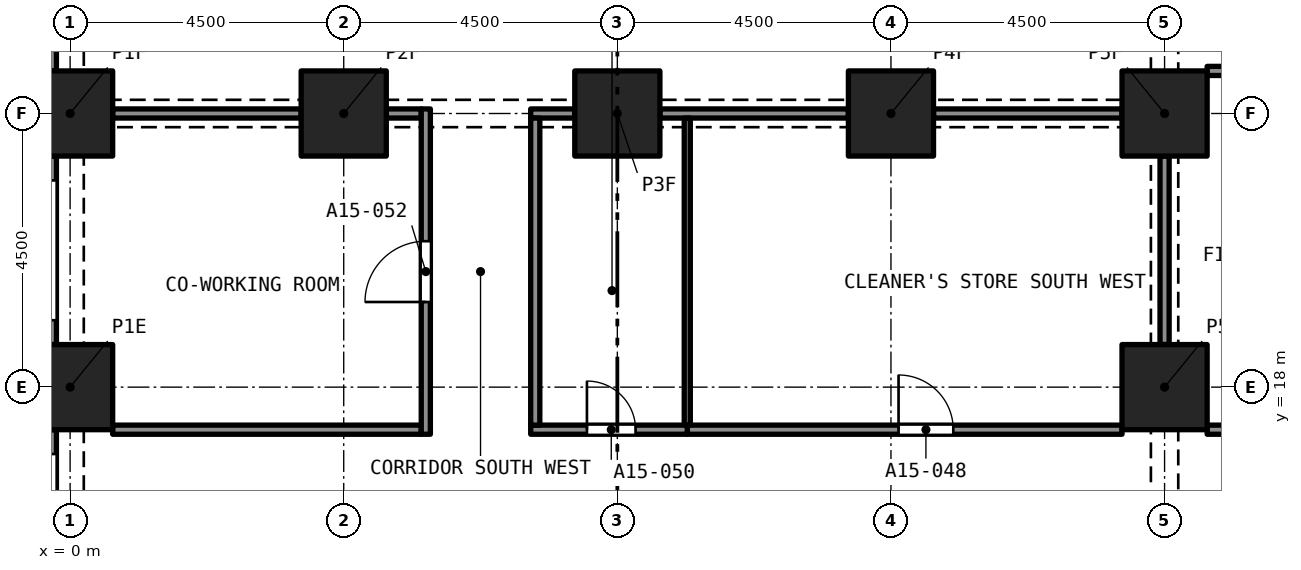
"""IFC4 building model, lengths in metres.
Left out: names, types, materials, properties, quantities, classifications, styles, units other than length and angle.
Written with IfcOpenShell. Run it as: python <this file> out.ifc"""

import sys

from ifc_helpers import new_model, si_unit, direction, frame, frame_2d, origin, origin_2d, place, context, subcontext, project, spatial, rectangle, extrude, element, fill, save


model = new_model("IFC4")
c1 = context("Model", 3, precision=1e-05, world=origin(), true_north=direction((0.0, 1.0)))
c2 = subcontext(c1, "Body", "Model", "MODEL_VIEW")
j1 = project(units=[si_unit("LENGTHUNIT", "METRE"), si_unit("PLANEANGLEUNIT", "RADIAN")], contexts=[c1])
p1 = place(None, origin())
s1 = spatial("IfcSite", under=j1, at=p1, CompositionType="ELEMENT")
p2 = place(p1, origin())
s2 = spatial("IfcBuilding", under=s1, at=p2, CompositionType="ELEMENT")
p3 = place(p2, frame((0.0, 0.0, 59.2)))
s3 = spatial("IfcBuildingStorey", under=s2, at=p3, CompositionType="ELEMENT", Elevation=59.2)
for number, where, z_axis, x_axis in (
    (1, (0.0, 18.0, 0.0), (0.0, 0.0, 1.0), (1.0, 0.0, 0.0)),
    (2, (18.0, 18.0, 0.0), (0.0, 0.0, 1.0), (1.0, 0.0, 0.0)),
    (3, (0.0, 22.5, 0.0), (0.0, 0.0, 1.0), (1.0, 0.0, 0.0)),
    (4, (4.5, 22.5, 0.0), (0.0, 0.0, 1.0), (1.0, 0.0, 0.0)),
    (5, (9.0, 22.5, 0.0), (0.0, 0.0, 1.0), (1.0, 0.0, 0.0)),
    (6, (13.5, 22.5, 0.0), (0.0, 0.0, 1.0), (1.0, 0.0, 0.0)),
    (7, (18.0, 22.5, 0.0), (0.0, 0.0, 1.0), (1.0, 0.0, 0.0)),
):
    element("IfcColumn", number, at=place(p3, frame(where, z_axis=z_axis, x_axis=x_axis)), inside=s3, PredefinedType="COLUMN", context=c2, shape_type="SweptSolid", body=[
        extrude(rectangle(XDim=1.4, YDim=1.4, at=origin_2d()), origin(), (0.0, 0.0, 1.0), 3.2),
    ])
p4 = place(p3, frame((-0.375, 23.2, 0.0), z_axis=(0.0, 0.0, 1.0), x_axis=(0.0, 1.0, 0.0)))
e8 = element("IfcWall", 8, at=p4, inside=s3, PredefinedType="SOLIDWALL", context=c2, shape_type="SweptSolid", body=[
    extrude(rectangle(XDim=3.1, YDim=0.3, at=frame_2d((1.55, 0.0))), origin(), (0.0, 0.0, 1.0), 3.2),
])
p5 = place(p4, frame((0.4, 0.0, 0.45)))
e9 = element("IfcOpeningElement", 9, at=p5, cuts=e8, PredefinedType="OPENING", context=c2, shape_type="SweptSolid", body=[
    extrude(rectangle(XDim=2.3, YDim=1.95, at=frame_2d((1.15, 0.975))), frame((0.0, 0.16, 0.0), z_axis=(0.0, -1.0, 0.0), x_axis=(1.0, 0.0, 0.0)), (0.0, 0.0, 1.0), 0.32),
])
p6 = place(p3, frame((-0.375, 18.7, 0.0), z_axis=(0.0, 0.0, 1.0), x_axis=(0.0, 1.0, 0.0)))
e10 = element("IfcWall", 10, at=p6, inside=s3, PredefinedType="SOLIDWALL", context=c2, shape_type="SweptSolid", body=[
    extrude(rectangle(XDim=3.1, YDim=0.3, at=frame_2d((1.55, 0.0))), origin(), (0.0, 0.0, 1.0), 3.2),
])
p7 = place(p6, frame((0.4, 0.0, 0.45)))
e11 = element("IfcOpeningElement", 11, at=p7, cuts=e10, PredefinedType="OPENING", context=c2, shape_type="SweptSolid", body=[
    extrude(rectangle(XDim=2.3, YDim=1.95, at=frame_2d((1.15, 0.975))), frame((0.0, 0.16, 0.0), z_axis=(0.0, -1.0, 0.0), x_axis=(1.0, 0.0, 0.0)), (0.0, 0.0, 1.0), 0.32),
])
p8 = place(p3, frame((-0.375, 14.2, 0.0), z_axis=(0.0, 0.0, 1.0), x_axis=(0.0, 1.0, 0.0)))
e12 = element("IfcWall", 12, at=p8, inside=s3, PredefinedType="SOLIDWALL", context=c2, shape_type="SweptSolid", body=[
    extrude(rectangle(XDim=3.1, YDim=0.3, at=frame_2d((1.55, 0.0))), origin(), (0.0, 0.0, 1.0), 3.2),
])
p9 = place(p8, frame((0.4, 0.0, 0.45)))
e13 = element("IfcOpeningElement", 13, at=p9, cuts=e12, PredefinedType="OPENING", context=c2, shape_type="SweptSolid", body=[
    extrude(rectangle(XDim=2.3, YDim=1.95, at=frame_2d((1.15, 0.975))), frame((0.0, 0.16, 0.0), z_axis=(0.0, -1.0, 0.0), x_axis=(1.0, 0.0, 0.0)), (0.0, 0.0, 1.0), 0.32),
])
p10 = place(p3, frame((18.7, 17.3, 0.0), z_axis=(0.0, 0.0, 1.0), x_axis=(1.0, 0.0, 0.0)))
e14 = element("IfcWall", 14, at=p10, inside=s3, PredefinedType="PARTITIONING", context=c2, shape_type="SweptSolid", body=[
    extrude(rectangle(XDim=5.075, YDim=0.15, at=frame_2d((2.538, 0.0))), origin(), (0.0, 0.0, 1.0), 2.75),
])
p11 = place(p3, frame((10.15, 17.3, 0.0), z_axis=(0.0, 0.0, 1.0), x_axis=(1.0, 0.0, 0.0)))
e15 = element("IfcWall", 15, at=p11, inside=s3, PredefinedType="PARTITIONING", context=c2, shape_type="SweptSolid", body=[
    extrude(rectangle(XDim=7.15, YDim=0.15, at=frame_2d((3.575, 0.0))), origin(), (0.0, 0.0, 1.0), 2.9),
])
p12 = place(p11, frame((3.475, 0.0, 0.0)))
e16 = element("IfcOpeningElement", 16, at=p12, cuts=e15, PredefinedType="OPENING", context=c2, shape_type="SweptSolid", body=[
    extrude(rectangle(XDim=0.9, YDim=2.1, at=frame_2d((0.45, 1.05))), frame((0.0, 0.085, 0.0), z_axis=(0.0, -1.0, 0.0), x_axis=(1.0, 0.0, 0.0)), (0.0, 0.0, 1.0), 0.17),
])
p13 = place(p3, frame((7.575, 17.3, 0.0), z_axis=(0.0, 0.0, 1.0), x_axis=(1.0, 0.0, 0.0)))
e17 = element("IfcWall", 17, at=p13, inside=s3, PredefinedType="PARTITIONING", context=c2, shape_type="SweptSolid", body=[
    extrude(rectangle(XDim=2.575, YDim=0.15, at=frame_2d((1.288, 0.0))), origin(), (0.0, 0.0, 1.0), 2.9),
])
p14 = place(p13, frame((0.925, 0.0, 0.0)))
e18 = element("IfcOpeningElement", 18, at=p14, cuts=e17, PredefinedType="OPENING", context=c2, shape_type="SweptSolid", body=[
    extrude(rectangle(XDim=0.8, YDim=2.1, at=frame_2d((0.4, 1.05))), frame((0.0, 0.085, 0.0), z_axis=(0.0, -1.0, 0.0), x_axis=(1.0, 0.0, 0.0)), (0.0, 0.0, 1.0), 0.17),
])
p15 = place(p3, frame((0.7, 17.3, 0.0), z_axis=(0.0, 0.0, 1.0), x_axis=(1.0, 0.0, 0.0)))
e19 = element("IfcWall", 19, at=p15, inside=s3, PredefinedType="PARTITIONING", context=c2, shape_type="SweptSolid", body=[
    extrude(rectangle(XDim=5.075, YDim=0.15, at=frame_2d((2.538, 0.0))), origin(), (0.0, 0.0, 1.0), 2.9),
])
p16 = place(p3, frame((18.7, 23.2, 0.0), z_axis=(0.0, 0.0, 1.0), x_axis=(1.0, 0.0, 0.0)))
e20 = element("IfcWall", 20, at=p16, inside=s3, PredefinedType="PARTITIONING", context=c2, shape_type="SweptSolid", body=[
    extrude(rectangle(XDim=5.075, YDim=0.15, at=frame_2d((2.538, 0.0))), origin(), (0.0, 0.0, 1.0), 2.75),
])
for number, where, z_axis, x_axis in (
    (21, (18.0, 18.7, 0.0), (0.0, 0.0, 1.0), (0.0, 1.0, 0.0)),
    (22, (14.2, 22.5, 0.0), (0.0, 0.0, 1.0), (1.0, 0.0, 0.0)),
    (23, (9.7, 22.5, 0.0), (0.0, 0.0, 1.0), (1.0, 0.0, 0.0)),
):
    element("IfcWall", number, at=place(p3, frame(where, z_axis=z_axis, x_axis=x_axis)), inside=s3, PredefinedType="PARTITIONING", context=c2, shape_type="SweptSolid", body=[
        extrude(rectangle(XDim=3.1, YDim=0.15, at=frame_2d((1.55, 0.0))), origin(), (0.0, 0.0, 1.0), 2.38),
    ])
p17 = place(p3, frame((7.575, 22.5, 0.0), z_axis=(0.0, 0.0, 1.0), x_axis=(1.0, 0.0, 0.0)))
e24 = element("IfcWall", 24, at=p17, inside=s3, PredefinedType="PARTITIONING", context=c2, shape_type="SweptSolid", body=[
    extrude(rectangle(XDim=0.725, YDim=0.15, at=frame_2d((0.363, 0.0))), origin(), (0.0, 0.0, 1.0), 2.38),
])
p18 = place(p3, frame((5.2, 22.5, 0.0), z_axis=(0.0, 0.0, 1.0), x_axis=(1.0, 0.0, 0.0)))
e25 = element("IfcWall", 25, at=p18, inside=s3, PredefinedType="PARTITIONING", context=c2, shape_type="SweptSolid", body=[
    extrude(rectangle(XDim=0.575, YDim=0.15, at=frame_2d((0.288, 0.0))), origin(), (0.0, 0.0, 1.0), 2.38),
])
p19 = place(p3, frame((0.7, 22.5, 0.0), z_axis=(0.0, 0.0, 1.0), x_axis=(1.0, 0.0, 0.0)))
e26 = element("IfcWall", 26, at=p19, inside=s3, PredefinedType="PARTITIONING", context=c2, shape_type="SweptSolid", body=[
    extrude(rectangle(XDim=3.1, YDim=0.15, at=frame_2d((1.55, 0.0))), origin(), (0.0, 0.0, 1.0), 2.38),
])
p20 = place(p3, frame((7.65, 17.375, 0.0), z_axis=(0.0, 0.0, 1.0), x_axis=(0.0, 1.0, 0.0)))
e27 = element("IfcWall", 27, at=p20, inside=s3, PredefinedType="PARTITIONING", context=c2, shape_type="SweptSolid", body=[
    extrude(rectangle(XDim=5.05, YDim=0.15, at=frame_2d((2.525, 0.0))), origin(), (0.0, 0.0, 1.0), 2.9),
])
p21 = place(p3, frame((5.85, 17.225, 0.0), z_axis=(0.0, 0.0, 1.0), x_axis=(0.0, 1.0, 0.0)))
e28 = element("IfcWall", 28, at=p21, inside=s3, PredefinedType="PARTITIONING", context=c2, shape_type="SweptSolid", body=[
    extrude(rectangle(XDim=5.35, YDim=0.15, at=frame_2d((2.675, 0.0))), origin(), (0.0, 0.0, 1.0), 2.9),
])
p22 = place(p21, frame((2.175, 0.0, 0.0)))
e29 = element("IfcOpeningElement", 29, at=p22, cuts=e28, PredefinedType="OPENING", context=c2, shape_type="SweptSolid", body=[
    extrude(rectangle(XDim=1.0, YDim=2.1, at=frame_2d((0.5, 1.05))), frame((0.0, 0.085, 0.0), z_axis=(0.0, -1.0, 0.0), x_axis=(1.0, 0.0, 0.0)), (0.0, 0.0, 1.0), 0.17),
])
p23 = place(p3, frame((10.15, 17.375, 0.0), z_axis=(0.0, 0.0, 1.0), x_axis=(0.0, 1.0, 0.0)))
e30 = element("IfcWall", 30, at=p23, inside=s3, PredefinedType="PARTITIONING", context=c2, shape_type="SweptSolid", body=[
    extrude(rectangle(XDim=5.05, YDim=0.1, at=frame_2d((2.525, 0.0))), origin(), (0.0, 0.0, 1.0), 2.9),
])
p24 = place(p12, origin())
e31 = element("IfcDoor", 31, at=p24, inside=s3, OperationType="SINGLE_SWING_RIGHT", PredefinedType="DOOR", context=c2, shape_type="SweptSolid", body=[
    extrude(rectangle(XDim=0.9, YDim=2.1, at=frame_2d((0.45, 1.05))), frame((0.0, 0.025, 0.0), z_axis=(0.0, -1.0, 0.0), x_axis=(1.0, 0.0, 0.0)), (0.0, 0.0, 1.0), 0.05),
])
fill(e16, e31)
p25 = place(p14, origin())
e32 = element("IfcDoor", 32, at=p25, inside=s3, OperationType="SINGLE_SWING_RIGHT", PredefinedType="DOOR", context=c2, shape_type="SweptSolid", body=[
    extrude(rectangle(XDim=0.8, YDim=2.1, at=frame_2d((0.4, 1.05))), frame((0.0, 0.025, 0.0), z_axis=(0.0, -1.0, 0.0), x_axis=(1.0, 0.0, 0.0)), (0.0, 0.0, 1.0), 0.05),
])
fill(e18, e32)
p26 = place(p22, origin())
e33 = element("IfcDoor", 33, at=p26, inside=s3, OperationType="SINGLE_SWING_LEFT", PredefinedType="DOOR", context=c2, shape_type="SweptSolid", body=[
    extrude(rectangle(XDim=1.0, YDim=2.1, at=frame_2d((0.5, 1.05))), frame((0.0, 0.025, 0.0), z_axis=(0.0, -1.0, 0.0), x_axis=(1.0, 0.0, 0.0)), (0.0, 0.0, 1.0), 0.05),
])
fill(e29, e33)
save(model, sys.argv[1])
